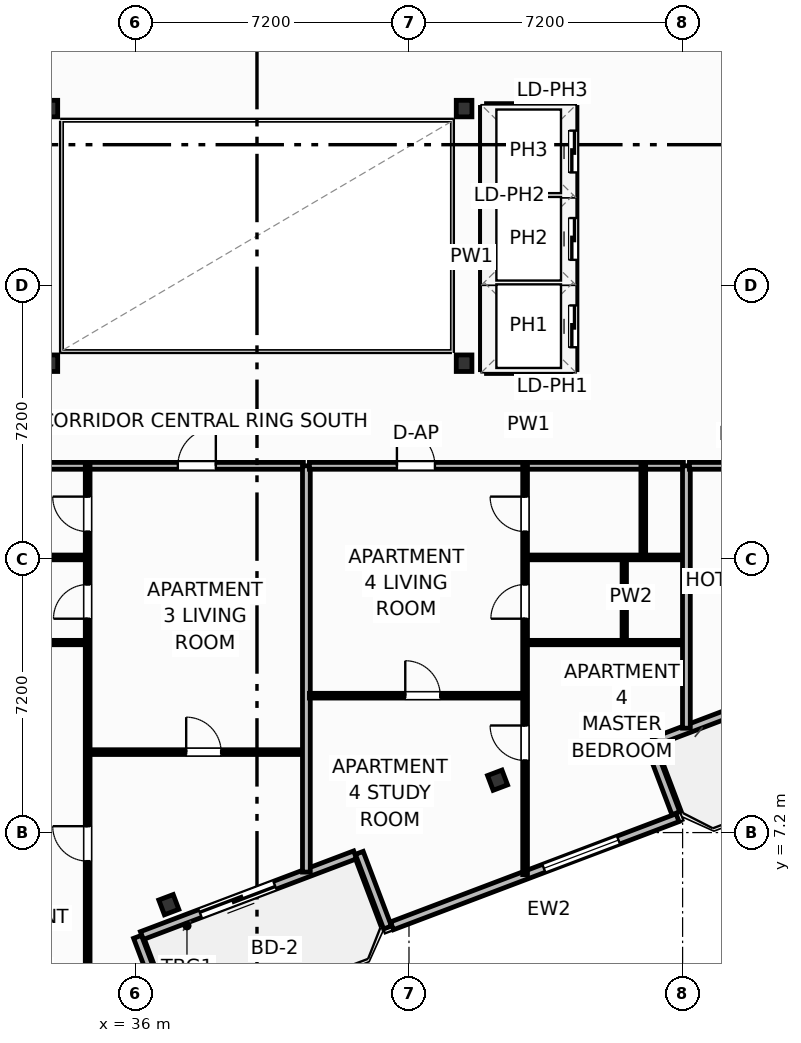
"""IFC4 building model, lengths in metres.
Left out: names, types, materials, properties, quantities, classifications, styles, units other than length and angle.
Written with IfcOpenShell. Run it as: python <this file> out.ifc"""

import sys

from ifc_helpers import new_model, si_unit, direction, frame, frame_2d, origin, origin_2d, place, context, subcontext, project, spatial, rectangle, i_section, extrude, element, fill, save


model = new_model("IFC4")
c1 = context("Model", 3, precision=1e-05, world=origin(), true_north=direction((0.0, 1.0)))
c2 = subcontext(c1, "Body", "Model", "MODEL_VIEW")
j1 = project(units=[si_unit("LENGTHUNIT", "METRE"), si_unit("PLANEANGLEUNIT", "RADIAN")], contexts=[c1])
p1 = place(None, origin())
s1 = spatial("IfcSite", under=j1, at=p1, CompositionType="ELEMENT")
p2 = place(p1, origin())
s2 = spatial("IfcBuilding", under=s1, at=p2, CompositionType="ELEMENT")
p3 = place(p2, frame((0.0, 0.0, 220.1)))
s3 = spatial("IfcBuildingStorey", under=s2, at=p3, CompositionType="ELEMENT", Elevation=220.1)
for number, where, z_axis, x_axis in (
    (1, (33.75, 19.55, 0.0), (0.0, 0.0, 1.0), (1.0, 0.0, 0.0)),
    (2, (44.65, 19.55, 0.0), (0.0, 0.0, 1.0), (1.0, 0.0, 0.0)),
    (3, (33.75, 26.25, 0.0), (0.0, 0.0, 1.0), (1.0, 0.0, 0.0)),
    (4, (44.65, 26.25, 0.0), (0.0, 0.0, 1.0), (1.0, 0.0, 0.0)),
):
    element("IfcColumn", number, at=place(p3, frame(where, z_axis=z_axis, x_axis=x_axis)), inside=s3, PredefinedType="COLUMN", context=c2, shape_type="SweptSolid", body=[
        extrude(i_section(OverallWidth=0.412, OverallDepth=0.435, WebThickness=0.036, FlangeThickness=0.057, FilletRadius=0.025, at=origin_2d()), origin(), (0.0, 0.0, 1.0), 3.7),
    ])
for number, where, z_axis, x_axis in (
    (5, (36.88, 5.303, 0.0), (0.0, 0.0, 1.0), (0.935, 0.354, 0.0)),
    (6, (45.531, 8.578, 0.0), (0.0, 0.0, 1.0), (0.935, 0.354, 0.0)),
):
    element("IfcColumn", number, at=place(p3, frame(where, z_axis=z_axis, x_axis=x_axis)), inside=s3, PredefinedType="COLUMN", context=c2, shape_type="SweptSolid", body=[
        extrude(i_section(OverallWidth=0.406, OverallDepth=0.416, WebThickness=0.03, FlangeThickness=0.048, FilletRadius=0.025, at=origin_2d()), origin(), (0.0, 0.0, 1.0), 3.7),
    ])
p4 = place(p3, frame((41.783, 6.614, 0.0), z_axis=(0.0, 0.0, 1.0), x_axis=(-0.93521416643, -0.354082565101, 0.0)))
e7 = element("IfcWall", 7, at=p4, inside=s3, PredefinedType="SOLIDWALL", context=c2, shape_type="SweptSolid", body=[
    extrude(rectangle(XDim=6.0, YDim=0.22, at=frame_2d((3.0, 0.0))), origin(), (0.0, 0.0, 1.0), 2.73),
])
p5 = place(p4, frame((2.26, 0.0, 0.0)))
e8 = element("IfcOpeningElement", 8, at=p5, cuts=e7, PredefinedType="OPENING", context=c2, shape_type="SweptSolid", body=[
    extrude(rectangle(XDim=2.1, YDim=2.3, at=frame_2d((1.05, 1.15))), frame((0.0, 0.12, 0.0), z_axis=(0.0, -1.0, 0.0), x_axis=(1.0, 0.0, 0.0)), (0.0, 0.0, 1.0), 0.24),
])
p6 = place(p3, frame((55.25, 11.713, 0.0), z_axis=(0.0, 0.0, 1.0), x_axis=(-0.935227640088, -0.354046976001, 0.0)))
e9 = element("IfcWall", 9, at=p6, inside=s3, PredefinedType="SOLIDWALL", context=c2, shape_type="SweptSolid", body=[
    extrude(rectangle(XDim=6.0, YDim=0.22, at=frame_2d((3.0, 0.0))), origin(), (0.0, 0.0, 1.0), 2.73),
])
p7 = place(p6, frame((1.516, 0.0, 0.0)))
e10 = element("IfcOpeningElement", 10, at=p7, cuts=e9, PredefinedType="OPENING", context=c2, shape_type="SweptSolid", body=[
    extrude(rectangle(XDim=2.1, YDim=2.3, at=frame_2d((1.05, 1.15))), frame((0.0, 0.12, 0.0), z_axis=(0.0, -1.0, 0.0), x_axis=(1.0, 0.0, 0.0)), (0.0, 0.0, 1.0), 0.24),
])
p8 = place(p3, frame((36.755, 2.61, 0.0), z_axis=(0.0, 0.0, 1.0), x_axis=(-0.354020680661, 0.935237594232, 0.0)))
e11 = element("IfcWall", 11, at=p8, inside=s3, PredefinedType="SOLIDWALL", context=c2, shape_type="SweptSolid", body=[
    extrude(rectangle(XDim=1.975, YDim=0.22, at=frame_2d((0.988, 0.0))), origin(), (0.0, 0.0, 1.0), 2.73),
])
p9 = place(p3, frame((41.892, 6.666, 0.0), z_axis=(0.0, 0.0, 1.0), x_axis=(0.354128469405, -0.935196785258, 0.0)))
e12 = element("IfcWall", 12, at=p9, inside=s3, PredefinedType="SOLIDWALL", context=c2, shape_type="SweptSolid", body=[
    extrude(rectangle(XDim=2.1, YDim=0.22, at=frame_2d((1.05, 0.0))), origin(), (0.0, 0.0, 1.0), 2.73),
])
p10 = place(p3, frame((42.752, 4.746, 0.0), z_axis=(0.0, 0.0, 1.0), x_axis=(0.935216926991, 0.354075273733, 0.0)))
e13 = element("IfcWall", 13, at=p10, inside=s3, PredefinedType="SOLIDWALL", context=c2, shape_type="SweptSolid", body=[
    extrude(rectangle(XDim=8.035, YDim=0.22, at=frame_2d((4.018, 0.0))), origin(), (0.0, 0.0, 1.0), 2.73),
])
p11 = place(p10, frame((4.273, 0.0, 0.8)))
e14 = element("IfcOpeningElement", 14, at=p11, cuts=e13, PredefinedType="OPENING", context=c2, shape_type="SweptSolid", body=[
    extrude(rectangle(XDim=2.1, YDim=1.75, at=frame_2d((1.05, 0.875))), frame((0.0, 0.12, 0.0), z_axis=(0.0, -1.0, 0.0), x_axis=(1.0, 0.0, 0.0)), (0.0, 0.0, 1.0), 0.24),
])
p12 = place(p3, frame((50.223, 7.708, 0.0), z_axis=(0.0, 0.0, 1.0), x_axis=(-0.354020680661, 0.935237594232, 0.0)))
e15 = element("IfcWall", 15, at=p12, inside=s3, PredefinedType="SOLIDWALL", context=c2, shape_type="SweptSolid", body=[
    extrude(rectangle(XDim=1.975, YDim=0.22, at=frame_2d((0.988, 0.0))), origin(), (0.0, 0.0, 1.0), 2.73),
])
p13 = place(p3, frame((34.815, 9.317, 0.0), z_axis=(0.0, 0.0, 1.0), x_axis=(1.0, 0.0, 0.0)))
e16 = element("IfcWall", 16, at=p13, inside=s3, PredefinedType="PARTITIONING", context=c2, shape_type="SweptSolid", body=[
    extrude(rectangle(XDim=5.605, YDim=0.125, at=frame_2d((2.803, 0.0))), origin(), (0.0, 0.0, 1.0), 3.45),
])
p14 = place(p13, frame((2.522, 0.0, 0.0)))
e17 = element("IfcOpeningElement", 17, at=p14, cuts=e16, PredefinedType="OPENING", context=c2, shape_type="SweptSolid", body=[
    extrude(rectangle(XDim=0.92, YDim=2.05, at=frame_2d((0.46, 1.025))), frame((0.0, 0.073, 0.0), z_axis=(0.0, -1.0, 0.0), x_axis=(1.0, 0.0, 0.0)), (0.0, 0.0, 1.0), 0.145),
])
p15 = place(p3, frame((30.58, 16.85, 0.0), z_axis=(0.0, 0.0, 1.0), x_axis=(1.0, 0.0, 0.0)))
e18 = element("IfcWall", 18, at=p15, inside=s3, PredefinedType="PARTITIONING", context=c2, shape_type="SweptSolid", body=[
    extrude(rectangle(XDim=9.84, YDim=0.18, at=frame_2d((4.92, 0.0))), origin(), (0.0, 0.0, 1.0), 3.45),
])
p16 = place(p15, frame((6.537, 0.0, 0.0)))
e19 = element("IfcOpeningElement", 19, at=p16, cuts=e18, PredefinedType="OPENING", context=c2, shape_type="SweptSolid", body=[
    extrude(rectangle(XDim=1.0, YDim=2.2, at=frame_2d((0.5, 1.1))), frame((0.0, 0.1, 0.0), z_axis=(0.0, -1.0, 0.0), x_axis=(1.0, 0.0, 0.0)), (0.0, 0.0, 1.0), 0.2),
])
p17 = place(p3, frame((34.745, 1.736, 0.0), z_axis=(0.0, 0.0, 1.0), x_axis=(0.0, 1.0, 0.0)))
e20 = element("IfcWall", 20, at=p17, inside=s3, PredefinedType="PARTITIONING", context=c2, shape_type="SweptSolid", body=[
    extrude(rectangle(XDim=15.114, YDim=0.125, at=frame_2d((7.557, 0.0))), origin(), (0.0, 0.0, 1.0), 2.739),
])
p18 = place(p17, frame((4.712, 0.0, 0.0)))
e21 = element("IfcOpeningElement", 21, at=p18, cuts=e20, PredefinedType="OPENING", context=c2, shape_type="SweptSolid", body=[
    extrude(rectangle(XDim=0.92, YDim=2.05, at=frame_2d((0.46, 1.025))), frame((0.0, 0.073, 0.0), z_axis=(0.0, -1.0, 0.0), x_axis=(1.0, 0.0, 0.0)), (0.0, 0.0, 1.0), 0.145),
])
p19 = place(p17, frame((11.091, 0.0, 0.0)))
e22 = element("IfcOpeningElement", 22, at=p19, cuts=e20, PredefinedType="OPENING", context=c2, shape_type="SweptSolid", body=[
    extrude(rectangle(XDim=0.9, YDim=2.05, at=frame_2d((0.45, 1.025))), frame((0.0, 0.073, 0.0), z_axis=(0.0, -1.0, 0.0), x_axis=(1.0, 0.0, 0.0)), (0.0, 0.0, 1.0), 0.145),
])
p20 = place(p17, frame((13.384, 0.0, 0.0)))
e23 = element("IfcOpeningElement", 23, at=p20, cuts=e20, PredefinedType="OPENING", context=c2, shape_type="SweptSolid", body=[
    extrude(rectangle(XDim=0.92, YDim=2.05, at=frame_2d((0.46, 1.025))), frame((0.0, 0.073, 0.0), z_axis=(0.0, -1.0, 0.0), x_axis=(1.0, 0.0, 0.0)), (0.0, 0.0, 1.0), 0.145),
])
p21 = place(p3, frame((30.58, 14.44, 0.0), z_axis=(0.0, 0.0, 1.0), x_axis=(1.0, 0.0, 0.0)))
e24 = element("IfcWall", 24, at=p21, inside=s3, PredefinedType="PARTITIONING", context=c2, shape_type="SweptSolid", body=[
    extrude(rectangle(XDim=4.095, YDim=0.125, at=frame_2d((2.047, 0.0))), origin(), (0.0, 0.0, 1.0), 3.45),
])
p22 = place(p3, frame((30.58, 12.2, 0.0), z_axis=(0.0, 0.0, 1.0), x_axis=(1.0, 0.0, 0.0)))
e25 = element("IfcWall", 25, at=p22, inside=s3, PredefinedType="PARTITIONING", context=c2, shape_type="SweptSolid", body=[
    extrude(rectangle(XDim=4.095, YDim=0.115, at=frame_2d((2.047, 0.0))), origin(), (0.0, 0.0, 1.0), 3.45),
])
p23 = place(p3, frame((40.5, 6.16, 0.0), z_axis=(0.0, 0.0, 1.0), x_axis=(0.0, 1.0, 0.0)))
e26 = element("IfcWall", 26, at=p23, inside=s3, PredefinedType="PARTITIONING", context=c2, shape_type="SweptSolid", body=[
    extrude(rectangle(XDim=10.69, YDim=0.205, at=frame_2d((5.345, 0.0))), origin(), (0.0, 0.0, 1.0), 3.45),
])
p24 = place(p3, frame((40.58, 10.802, 0.0), z_axis=(0.0, 0.0, 1.0), x_axis=(1.0, 0.0, 0.0)))
e27 = element("IfcWall", 27, at=p24, inside=s3, PredefinedType="PARTITIONING", context=c2, shape_type="SweptSolid", body=[
    extrude(rectangle(XDim=5.605, YDim=0.125, at=frame_2d((2.803, 0.0))), origin(), (0.0, 0.0, 1.0), 3.45),
])
p25 = place(p24, frame((2.522, 0.0, 0.0)))
e28 = element("IfcOpeningElement", 28, at=p25, cuts=e27, PredefinedType="OPENING", context=c2, shape_type="SweptSolid", body=[
    extrude(rectangle(XDim=0.92, YDim=2.05, at=frame_2d((0.46, 1.025))), frame((0.0, 0.073, 0.0), z_axis=(0.0, -1.0, 0.0), x_axis=(1.0, 0.0, 0.0)), (0.0, 0.0, 1.0), 0.145),
])
p26 = place(p3, frame((40.58, 16.85, 0.0), z_axis=(0.0, 0.0, 1.0), x_axis=(1.0, 0.0, 0.0)))
e29 = element("IfcWall", 29, at=p26, inside=s3, PredefinedType="PARTITIONING", context=c2, shape_type="SweptSolid", body=[
    extrude(rectangle(XDim=9.84, YDim=0.18, at=frame_2d((4.92, 0.0))), origin(), (0.0, 0.0, 1.0), 3.45),
])
p27 = place(p26, frame((2.302, 0.0, 0.0)))
e30 = element("IfcOpeningElement", 30, at=p27, cuts=e29, PredefinedType="OPENING", context=c2, shape_type="SweptSolid", body=[
    extrude(rectangle(XDim=1.0, YDim=2.2, at=frame_2d((0.5, 1.1))), frame((0.0, 0.1, 0.0), z_axis=(0.0, -1.0, 0.0), x_axis=(1.0, 0.0, 0.0)), (0.0, 0.0, 1.0), 0.2),
])
p28 = place(p3, frame((46.255, 6.094, 0.0), z_axis=(0.0, 0.0, 1.0), x_axis=(0.0, 1.0, 0.0)))
e31 = element("IfcWall", 31, at=p28, inside=s3, PredefinedType="PARTITIONING", context=c2, shape_type="SweptSolid", body=[
    extrude(rectangle(XDim=10.756, YDim=0.125, at=frame_2d((5.378, 0.0))), origin(), (0.0, 0.0, 1.0), 3.45),
])
p29 = place(p28, frame((3.003, 0.0, 0.0)))
e32 = element("IfcOpeningElement", 32, at=p29, cuts=e31, PredefinedType="OPENING", context=c2, shape_type="SweptSolid", body=[
    extrude(rectangle(XDim=0.92, YDim=2.05, at=frame_2d((0.46, 1.025))), frame((0.0, 0.073, 0.0), z_axis=(0.0, -1.0, 0.0), x_axis=(1.0, 0.0, 0.0)), (0.0, 0.0, 1.0), 0.145),
])
p30 = place(p28, frame((6.733, 0.0, 0.0)))
e33 = element("IfcOpeningElement", 33, at=p30, cuts=e31, PredefinedType="OPENING", context=c2, shape_type="SweptSolid", body=[
    extrude(rectangle(XDim=0.9, YDim=2.05, at=frame_2d((0.45, 1.025))), frame((0.0, 0.073, 0.0), z_axis=(0.0, -1.0, 0.0), x_axis=(1.0, 0.0, 0.0)), (0.0, 0.0, 1.0), 0.145),
])
p31 = place(p28, frame((9.026, 0.0, 0.0)))
e34 = element("IfcOpeningElement", 34, at=p31, cuts=e31, PredefinedType="OPENING", context=c2, shape_type="SweptSolid", body=[
    extrude(rectangle(XDim=0.92, YDim=2.05, at=frame_2d((0.46, 1.025))), frame((0.0, 0.073, 0.0), z_axis=(0.0, -1.0, 0.0), x_axis=(1.0, 0.0, 0.0)), (0.0, 0.0, 1.0), 0.145),
])
p32 = place(p3, frame((46.325, 14.44, 0.0), z_axis=(0.0, 0.0, 1.0), x_axis=(1.0, 0.0, 0.0)))
e35 = element("IfcWall", 35, at=p32, inside=s3, PredefinedType="PARTITIONING", context=c2, shape_type="SweptSolid", body=[
    extrude(rectangle(XDim=4.095, YDim=0.125, at=frame_2d((2.047, 0.0))), origin(), (0.0, 0.0, 1.0), 3.45),
])
p33 = place(p3, frame((46.325, 12.2, 0.0), z_axis=(0.0, 0.0, 1.0), x_axis=(1.0, 0.0, 0.0)))
e36 = element("IfcWall", 36, at=p33, inside=s3, PredefinedType="PARTITIONING", context=c2, shape_type="SweptSolid", body=[
    extrude(rectangle(XDim=4.095, YDim=0.115, at=frame_2d((2.047, 0.0))), origin(), (0.0, 0.0, 1.0), 3.45),
])
p34 = place(p3, frame((49.365, 14.44, 0.0), z_axis=(0.0, 0.0, 1.0), x_axis=(0.0, 1.0, 0.0)))
e37 = element("IfcWall", 37, at=p34, inside=s3, PredefinedType="PARTITIONING", context=c2, shape_type="SweptSolid", body=[
    extrude(rectangle(XDim=2.41, YDim=0.125, at=frame_2d((1.205, 0.0))), origin(), (0.0, 0.0, 1.0), 3.45),
])
p35 = place(p3, frame((48.865, 12.2, 0.0), z_axis=(0.0, 0.0, 1.0), x_axis=(0.0, 1.0, 0.0)))
e38 = element("IfcWall", 38, at=p35, inside=s3, PredefinedType="PARTITIONING", context=c2, shape_type="SweptSolid", body=[
    extrude(rectangle(XDim=2.24, YDim=0.115, at=frame_2d((1.12, 0.0))), origin(), (0.0, 0.0, 1.0), 3.45),
])
p36 = place(p3, frame((50.5, 9.946, 0.0), z_axis=(0.0, 0.0, 1.0), x_axis=(0.0, 1.0, 0.0)))
e39 = element("IfcWall", 39, at=p36, inside=s3, PredefinedType="PARTITIONING", context=c2, shape_type="SweptSolid", body=[
    extrude(rectangle(XDim=6.904, YDim=0.205, at=frame_2d((3.452, 0.0))), origin(), (0.0, 0.0, 1.0), 3.45),
])
p37 = place(p3, frame((50.58, 16.85, 0.0), z_axis=(0.0, 0.0, 1.0), x_axis=(1.0, 0.0, 0.0)))
e40 = element("IfcWall", 40, at=p37, inside=s3, PredefinedType="PARTITIONING", context=c2, shape_type="SweptSolid", body=[
    extrude(rectangle(XDim=23.404, YDim=0.18, at=frame_2d((11.702, 0.0))), origin(), (0.0, 0.0, 1.0), 3.45),
])
p38 = place(p37, frame((0.935, 0.0, 0.0)))
e41 = element("IfcOpeningElement", 41, at=p38, cuts=e40, PredefinedType="OPENING", context=c2, shape_type="SweptSolid", body=[
    extrude(rectangle(XDim=0.95, YDim=2.15, at=frame_2d((0.475, 1.075))), frame((0.0, 0.1, 0.0), z_axis=(0.0, -1.0, 0.0), x_axis=(1.0, 0.0, 0.0)), (0.0, 0.0, 1.0), 0.2),
])
for number, where, z_axis, x_axis in (
    (42, (45.24, 21.675, 0.0), (0.0, 0.0, 1.0), (1.0, 0.0, 0.0)),
    (43, (45.24, 23.975, 0.0), (0.0, 0.0, 1.0), (1.0, 0.0, 0.0)),
):
    element("IfcWall", number, at=place(p3, frame(where, z_axis=z_axis, x_axis=x_axis)), inside=s3, PredefinedType="PARTITIONING", context=c2, shape_type="SweptSolid", body=[
        extrude(rectangle(XDim=2.22, YDim=0.2, at=frame_2d((1.11, 0.0))), origin(), (0.0, 0.0, 1.0), 3.45),
    ])
p39 = place(p3, frame((45.24, 19.38, 0.0), z_axis=(0.0, 0.0, 1.0), x_axis=(1.0, 0.0, 0.0)))
e44 = element("IfcWall", 44, at=p39, inside=s3, PredefinedType="PARTITIONING", context=c2, shape_type="SweptSolid", body=[
    extrude(rectangle(XDim=2.22, YDim=0.2, at=frame_2d((1.11, 0.0))), origin(), (0.0, 0.0, 1.0), 2.662),
])
p40 = place(p3, frame((45.24, 26.28, 0.0), z_axis=(0.0, 0.0, 1.0), x_axis=(1.0, 0.0, 0.0)))
e45 = element("IfcWall", 45, at=p40, inside=s3, PredefinedType="PARTITIONING", context=c2, shape_type="SweptSolid", body=[
    extrude(rectangle(XDim=2.22, YDim=0.2, at=frame_2d((1.11, 0.0))), origin(), (0.0, 0.0, 1.0), 3.45),
])
p41 = place(p3, frame((45.18, 19.38, 0.0), z_axis=(0.0, 0.0, 1.0), x_axis=(0.0, 1.0, 0.0)))
e46 = element("IfcWall", 46, at=p41, inside=s3, PredefinedType="PARTITIONING", context=c2, shape_type="SweptSolid", body=[
    extrude(rectangle(XDim=6.9, YDim=0.2, at=frame_2d((3.45, 0.0))), origin(), (0.0, 0.0, 1.0), 3.45),
])
p42 = place(p3, frame((47.52, 19.38, 0.0), z_axis=(0.0, 0.0, 1.0), x_axis=(0.0, 1.0, 0.0)))
e47 = element("IfcWall", 47, at=p42, inside=s3, PredefinedType="PARTITIONING", context=c2, shape_type="SweptSolid", body=[
    extrude(rectangle(XDim=6.9, YDim=0.2, at=frame_2d((3.45, 0.0))), origin(), (0.0, 0.0, 1.0), 3.45),
])
p43 = place(p42, frame((0.59, 0.0, 0.0)))
e48 = element("IfcOpeningElement", 48, at=p43, cuts=e47, PredefinedType="OPENING", context=c2, shape_type="SweptSolid", body=[
    extrude(rectangle(XDim=1.1, YDim=2.15, at=frame_2d((0.55, 1.075))), frame((0.0, 0.11, 0.0), z_axis=(0.0, -1.0, 0.0), x_axis=(1.0, 0.0, 0.0)), (0.0, 0.0, 1.0), 0.22),
])
p44 = place(p42, frame((2.89, 0.0, 0.0)))
e49 = element("IfcOpeningElement", 49, at=p44, cuts=e47, PredefinedType="OPENING", context=c2, shape_type="SweptSolid", body=[
    extrude(rectangle(XDim=1.1, YDim=2.15, at=frame_2d((0.55, 1.075))), frame((0.0, 0.11, 0.0), z_axis=(0.0, -1.0, 0.0), x_axis=(1.0, 0.0, 0.0)), (0.0, 0.0, 1.0), 0.22),
])
p45 = place(p42, frame((5.19, 0.0, 0.0)))
e50 = element("IfcOpeningElement", 50, at=p45, cuts=e47, PredefinedType="OPENING", context=c2, shape_type="SweptSolid", body=[
    extrude(rectangle(XDim=1.1, YDim=2.15, at=frame_2d((0.55, 1.075))), frame((0.0, 0.11, 0.0), z_axis=(0.0, -1.0, 0.0), x_axis=(1.0, 0.0, 0.0)), (0.0, 0.0, 1.0), 0.22),
])
p46 = place(p5, origin())
e51 = element("IfcDoor", 51, at=p46, inside=s3, OperationType="SLIDING_TO_LEFT", PredefinedType="DOOR", context=c2, shape_type="SweptSolid", body=[
    extrude(rectangle(XDim=2.1, YDim=2.3, at=frame_2d((1.05, 1.15))), frame((0.0, 0.025, 0.0), z_axis=(0.0, -1.0, 0.0), x_axis=(1.0, 0.0, 0.0)), (0.0, 0.0, 1.0), 0.05),
])
fill(e8, e51)
p47 = place(p11, origin())
e52 = element("IfcWindow", 52, at=p47, inside=s3, PartitioningType="SINGLE_PANEL", PredefinedType="WINDOW", context=c2, shape_type="SweptSolid", body=[
    extrude(rectangle(XDim=2.1, YDim=1.75, at=frame_2d((1.05, 0.875))), frame((0.0, 0.03, 0.0), z_axis=(0.0, -1.0, 0.0), x_axis=(1.0, 0.0, 0.0)), (0.0, 0.0, 1.0), 0.06),
])
fill(e14, e52)
p48 = place(p14, origin())
e53 = element("IfcDoor", 53, at=p48, inside=s3, OperationType="SINGLE_SWING_LEFT", PredefinedType="DOOR", context=c2, shape_type="SweptSolid", body=[
    extrude(rectangle(XDim=0.92, YDim=2.05, at=frame_2d((0.46, 1.025))), frame((0.0, 0.025, 0.0), z_axis=(0.0, -1.0, 0.0), x_axis=(1.0, 0.0, 0.0)), (0.0, 0.0, 1.0), 0.05),
])
fill(e17, e53)
p49 = place(p16, origin())
e54 = element("IfcDoor", 54, at=p49, inside=s3, OperationType="SINGLE_SWING_RIGHT", PredefinedType="DOOR", context=c2, shape_type="SweptSolid", body=[
    extrude(rectangle(XDim=1.0, YDim=2.2, at=frame_2d((0.5, 1.1))), frame((0.0, 0.025, 0.0), z_axis=(0.0, -1.0, 0.0), x_axis=(1.0, 0.0, 0.0)), (0.0, 0.0, 1.0), 0.05),
])
fill(e19, e54)
p50 = place(p18, origin())
e55 = element("IfcDoor", 55, at=p50, inside=s3, OperationType="SINGLE_SWING_RIGHT", PredefinedType="DOOR", context=c2, shape_type="SweptSolid", body=[
    extrude(rectangle(XDim=0.92, YDim=2.05, at=frame_2d((0.46, 1.025))), frame((0.0, 0.025, 0.0), z_axis=(0.0, -1.0, 0.0), x_axis=(1.0, 0.0, 0.0)), (0.0, 0.0, 1.0), 0.05),
])
fill(e21, e55)
p51 = place(p19, origin())
e56 = element("IfcDoor", 56, at=p51, inside=s3, OperationType="SINGLE_SWING_LEFT", PredefinedType="DOOR", context=c2, shape_type="SweptSolid", body=[
    extrude(rectangle(XDim=0.9, YDim=2.05, at=frame_2d((0.45, 1.025))), frame((0.0, 0.025, 0.0), z_axis=(0.0, -1.0, 0.0), x_axis=(1.0, 0.0, 0.0)), (0.0, 0.0, 1.0), 0.05),
])
fill(e22, e56)
p52 = place(p20, origin())
e57 = element("IfcDoor", 57, at=p52, inside=s3, OperationType="SINGLE_SWING_RIGHT", PredefinedType="DOOR", context=c2, shape_type="SweptSolid", body=[
    extrude(rectangle(XDim=0.92, YDim=2.05, at=frame_2d((0.46, 1.025))), frame((0.0, 0.025, 0.0), z_axis=(0.0, -1.0, 0.0), x_axis=(1.0, 0.0, 0.0)), (0.0, 0.0, 1.0), 0.05),
])
fill(e23, e57)
p53 = place(p25, origin())
e58 = element("IfcDoor", 58, at=p53, inside=s3, OperationType="SINGLE_SWING_LEFT", PredefinedType="DOOR", context=c2, shape_type="SweptSolid", body=[
    extrude(rectangle(XDim=0.92, YDim=2.05, at=frame_2d((0.46, 1.025))), frame((0.0, 0.025, 0.0), z_axis=(0.0, -1.0, 0.0), x_axis=(1.0, 0.0, 0.0)), (0.0, 0.0, 1.0), 0.05),
])
fill(e28, e58)
p54 = place(p27, origin())
e59 = element("IfcDoor", 59, at=p54, inside=s3, OperationType="SINGLE_SWING_LEFT", PredefinedType="DOOR", context=c2, shape_type="SweptSolid", body=[
    extrude(rectangle(XDim=1.0, YDim=2.2, at=frame_2d((0.5, 1.1))), frame((0.0, 0.025, 0.0), z_axis=(0.0, -1.0, 0.0), x_axis=(1.0, 0.0, 0.0)), (0.0, 0.0, 1.0), 0.05),
])
fill(e30, e59)
p55 = place(p29, origin())
e60 = element("IfcDoor", 60, at=p55, inside=s3, OperationType="SINGLE_SWING_RIGHT", PredefinedType="DOOR", context=c2, shape_type="SweptSolid", body=[
    extrude(rectangle(XDim=0.92, YDim=2.05, at=frame_2d((0.46, 1.025))), frame((0.0, 0.025, 0.0), z_axis=(0.0, -1.0, 0.0), x_axis=(1.0, 0.0, 0.0)), (0.0, 0.0, 1.0), 0.05),
])
fill(e32, e60)
p56 = place(p30, origin())
e61 = element("IfcDoor", 61, at=p56, inside=s3, OperationType="SINGLE_SWING_LEFT", PredefinedType="DOOR", context=c2, shape_type="SweptSolid", body=[
    extrude(rectangle(XDim=0.9, YDim=2.05, at=frame_2d((0.45, 1.025))), frame((0.0, 0.025, 0.0), z_axis=(0.0, -1.0, 0.0), x_axis=(1.0, 0.0, 0.0)), (0.0, 0.0, 1.0), 0.05),
])
fill(e33, e61)
p57 = place(p31, origin())
e62 = element("IfcDoor", 62, at=p57, inside=s3, OperationType="SINGLE_SWING_RIGHT", PredefinedType="DOOR", context=c2, shape_type="SweptSolid", body=[
    extrude(rectangle(XDim=0.92, YDim=2.05, at=frame_2d((0.46, 1.025))), frame((0.0, 0.025, 0.0), z_axis=(0.0, -1.0, 0.0), x_axis=(1.0, 0.0, 0.0)), (0.0, 0.0, 1.0), 0.05),
])
fill(e34, e62)
p58 = place(p43, origin())
e63 = element("IfcDoor", 63, at=p58, inside=s3, OperationType="SLIDING_TO_LEFT", PredefinedType="DOOR", context=c2, shape_type="SweptSolid", body=[
    extrude(rectangle(XDim=1.1, YDim=2.15, at=frame_2d((0.55, 1.075))), frame((0.0, 0.025, 0.0), z_axis=(0.0, -1.0, 0.0), x_axis=(1.0, 0.0, 0.0)), (0.0, 0.0, 1.0), 0.05),
])
fill(e48, e63)
p59 = place(p44, origin())
e64 = element("IfcDoor", 64, at=p59, inside=s3, OperationType="SLIDING_TO_LEFT", PredefinedType="DOOR", context=c2, shape_type="SweptSolid", body=[
    extrude(rectangle(XDim=1.1, YDim=2.15, at=frame_2d((0.55, 1.075))), frame((0.0, 0.025, 0.0), z_axis=(0.0, -1.0, 0.0), x_axis=(1.0, 0.0, 0.0)), (0.0, 0.0, 1.0), 0.05),
])
fill(e49, e64)
p60 = place(p45, origin())
e65 = element("IfcDoor", 65, at=p60, inside=s3, OperationType="SLIDING_TO_LEFT", PredefinedType="DOOR", context=c2, shape_type="SweptSolid", body=[
    extrude(rectangle(XDim=1.1, YDim=2.15, at=frame_2d((0.55, 1.075))), frame((0.0, 0.025, 0.0), z_axis=(0.0, -1.0, 0.0), x_axis=(1.0, 0.0, 0.0)), (0.0, 0.0, 1.0), 0.05),
])
fill(e50, e65)
save(model, sys.argv[1])
